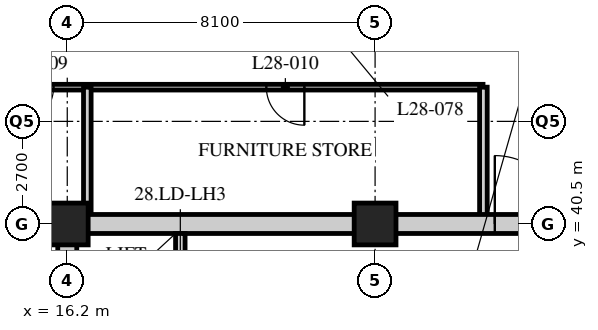
"""IFC4 building model, lengths in metres.
Left out: names, types, materials, properties, quantities, classifications, styles, units other than length and angle.
Written with IfcOpenShell. Run it as: python <this file> out.ifc"""

import sys

from ifc_helpers import new_model, si_unit, direction, frame, frame_2d, origin, origin_2d, place, context, subcontext, project, spatial, rectangle, hollow_rectangle, extrude, element, fill, save


model = new_model("IFC4")
c1 = context("Model", 3, precision=1e-05, world=origin(), true_north=direction((0.0, 1.0)))
c2 = subcontext(c1, "Body", "Model", "MODEL_VIEW")
j1 = project(units=[si_unit("LENGTHUNIT", "METRE"), si_unit("PLANEANGLEUNIT", "RADIAN")], contexts=[c1])
p1 = place(None, origin())
s1 = spatial("IfcSite", under=j1, at=p1, CompositionType="ELEMENT")
p2 = place(p1, origin())
s2 = spatial("IfcBuilding", under=s1, at=p2, CompositionType="ELEMENT")
p3 = place(p2, frame((0.0, 0.0, 113.6)))
s3 = spatial("IfcBuildingStorey", under=s2, at=p3, CompositionType="ELEMENT", Elevation=113.6)
for number, where, z_axis, x_axis in (
    (1, (16.2, 40.5, 0.0), (0.0, 0.0, 1.0), (1.0, 0.0, 0.0)),
    (2, (24.3, 40.5, 0.0), (0.0, 0.0, 1.0), (1.0, 0.0, 0.0)),
):
    element("IfcColumn", number, at=place(p3, frame(where, z_axis=z_axis, x_axis=x_axis)), inside=s3, PredefinedType="COLUMN", context=c2, shape_type="SweptSolid", body=[
        extrude(hollow_rectangle(XDim=1.1, YDim=1.1, WallThickness=0.1, at=origin_2d()), origin(), (0.0, 0.0, 1.0), 3.4),
    ])
p4 = place(p3, frame((27.14, 44.1, 0.0), z_axis=(0.0, 0.0, 1.0), x_axis=(-1.0, 0.0, 0.0)))
e3 = element("IfcWall", 3, at=p4, inside=s3, PredefinedType="PARTITIONING", context=c2, shape_type="SweptSolid", body=[
    extrude(rectangle(XDim=13.19, YDim=0.15, at=frame_2d((6.595, 0.0))), origin(), (0.0, 0.0, 1.0), 3.19),
])
p5 = place(p4, frame((11.301, 0.0, 0.0)))
e4 = element("IfcOpeningElement", 4, at=p5, cuts=e3, PredefinedType="OPENING", context=c2, shape_type="SweptSolid", body=[
    extrude(rectangle(XDim=1.0, YDim=2.1, at=frame_2d((0.5, 1.05))), frame((0.0, 0.085, 0.0), z_axis=(0.0, -1.0, 0.0), x_axis=(1.0, 0.0, 0.0)), (0.0, 0.0, 1.0), 0.17),
])
p6 = place(p4, frame((4.701, 0.0, 0.0)))
e5 = element("IfcOpeningElement", 5, at=p6, cuts=e3, PredefinedType="OPENING", context=c2, shape_type="SweptSolid", body=[
    extrude(rectangle(XDim=1.0, YDim=2.1, at=frame_2d((0.5, 1.05))), frame((0.0, 0.085, 0.0), z_axis=(0.0, -1.0, 0.0), x_axis=(1.0, 0.0, 0.0)), (0.0, 0.0, 1.0), 0.17),
])
for number, where, z_axis, x_axis in (
    (6, (16.728, 44.1, 0.0), (0.0, 0.0, 1.0), (0.0, -1.0, 0.0)),
    (7, (27.15, 40.5, 0.0), (0.0, 0.0, 1.0), (0.0, 1.0, 0.0)),
):
    element("IfcWall", number, at=place(p3, frame(where, z_axis=z_axis, x_axis=x_axis)), inside=s3, PredefinedType="SOLIDWALL", context=c2, shape_type="SweptSolid", body=[
        extrude(rectangle(XDim=3.6, YDim=0.2, at=frame_2d((1.8, 0.0))), origin(), (0.0, 0.0, 1.0), 3.19),
    ])
p7 = place(p3, frame((13.95, 40.5, 0.0), z_axis=(0.0, 0.0, 1.0), x_axis=(1.0, 0.0, 0.0)))
e8 = element("IfcWall", 8, at=p7, inside=s3, PredefinedType="SOLIDWALL", context=c2, shape_type="SweptSolid", body=[
    extrude(rectangle(XDim=2.25, YDim=0.2, at=frame_2d((1.125, 0.0))), origin(), (0.0, 0.0, 1.0), 3.19),
])
p8 = place(p3, frame((15.95, 40.5, 0.0), z_axis=(0.0, 0.0, 1.0), x_axis=(1.0, 0.0, 0.0)))
e9 = element("IfcWall", 9, at=p8, inside=s3, PredefinedType="SOLIDWALL", context=c2, shape_type="SweptSolid", body=[
    extrude(rectangle(XDim=24.8, YDim=0.5, at=frame_2d((12.4, 0.0))), origin(), (0.0, 0.0, 1.0), 2.54),
])
p9 = place(p8, frame((11.5, 0.0, 0.0)))
e10 = element("IfcOpeningElement", 10, at=p9, cuts=e9, PredefinedType="OPENING", context=c2, shape_type="SweptSolid", body=[
    extrude(rectangle(XDim=1.8, YDim=2.4, at=frame_2d((0.9, 1.2))), frame((0.0, 0.26, 0.0), z_axis=(0.0, -1.0, 0.0), x_axis=(1.0, 0.0, 0.0)), (0.0, 0.0, 1.0), 0.52),
])
p10 = place(p3, frame((16.2, 24.55, 0.0), z_axis=(0.0, 0.0, 1.0), x_axis=(0.0, 1.0, 0.0)))
e11 = element("IfcWall", 11, at=p10, inside=s3, PredefinedType="SOLIDWALL", context=c2, shape_type="SweptSolid", body=[
    extrude(rectangle(XDim=15.7, YDim=0.5, at=frame_2d((7.85, 0.0))), origin(), (0.0, 0.0, 1.0), 2.578),
])
p11 = place(p3, frame((19.175, 32.5, 0.0), z_axis=(0.0, 0.0, 1.0), x_axis=(0.0, 1.0, 0.0)))
e12 = element("IfcWall", 12, at=p11, inside=s3, PredefinedType="SOLIDWALL", context=c2, shape_type="SweptSolid", body=[
    extrude(rectangle(XDim=7.75, YDim=0.25, at=frame_2d((3.875, 0.0))), origin(), (0.0, 0.0, 1.0), 3.19),
])
p12 = place(p11, frame((0.8, 0.0, 0.0)))
e13 = element("IfcOpeningElement", 13, at=p12, cuts=e12, PredefinedType="OPENING", context=c2, shape_type="SweptSolid", body=[
    extrude(rectangle(XDim=1.1, YDim=2.4, at=frame_2d((0.55, 1.2))), frame((0.0, 0.135, 0.0), z_axis=(0.0, -1.0, 0.0), x_axis=(1.0, 0.0, 0.0)), (0.0, 0.0, 1.0), 0.27),
])
p13 = place(p11, frame((3.4, 0.0, 0.0)))
e14 = element("IfcOpeningElement", 14, at=p13, cuts=e12, PredefinedType="OPENING", context=c2, shape_type="SweptSolid", body=[
    extrude(rectangle(XDim=1.1, YDim=2.4, at=frame_2d((0.55, 1.2))), frame((0.0, 0.135, 0.0), z_axis=(0.0, -1.0, 0.0), x_axis=(1.0, 0.0, 0.0)), (0.0, 0.0, 1.0), 0.27),
])
p14 = place(p11, frame((6.0, 0.0, 0.0)))
e15 = element("IfcOpeningElement", 15, at=p14, cuts=e12, PredefinedType="OPENING", context=c2, shape_type="SweptSolid", body=[
    extrude(rectangle(XDim=1.1, YDim=2.4, at=frame_2d((0.55, 1.2))), frame((0.0, 0.135, 0.0), z_axis=(0.0, -1.0, 0.0), x_axis=(1.0, 0.0, 0.0)), (0.0, 0.0, 1.0), 0.27),
])
p15 = place(p5, origin())
e16 = element("IfcDoor", 16, at=p15, inside=s3, OperationType="SINGLE_SWING_RIGHT", PredefinedType="DOOR", context=c2, shape_type="SweptSolid", body=[
    extrude(rectangle(XDim=1.0, YDim=2.1, at=frame_2d((0.5, 1.05))), frame((0.0, 0.025, 0.0), z_axis=(0.0, -1.0, 0.0), x_axis=(1.0, 0.0, 0.0)), (0.0, 0.0, 1.0), 0.05),
])
fill(e4, e16)
p16 = place(p6, origin())
e17 = element("IfcDoor", 17, at=p16, inside=s3, OperationType="SINGLE_SWING_LEFT", PredefinedType="DOOR", context=c2, shape_type="SweptSolid", body=[
    extrude(rectangle(XDim=1.0, YDim=2.1, at=frame_2d((0.5, 1.05))), frame((0.0, 0.025, 0.0), z_axis=(0.0, -1.0, 0.0), x_axis=(1.0, 0.0, 0.0)), (0.0, 0.0, 1.0), 0.05),
])
fill(e5, e17)
p17 = place(p9, origin())
e18 = element("IfcDoor", 18, at=p17, inside=s3, OperationType="DOUBLE_DOOR_SINGLE_SWING", PredefinedType="DOOR", context=c2, shape_type="SweptSolid", body=[
    extrude(rectangle(XDim=1.8, YDim=2.4, at=frame_2d((0.9, 1.2))), frame((0.0, 0.025, 0.0), z_axis=(0.0, -1.0, 0.0), x_axis=(1.0, 0.0, 0.0)), (0.0, 0.0, 1.0), 0.05),
])
fill(e10, e18)
save(model, sys.argv[1])
